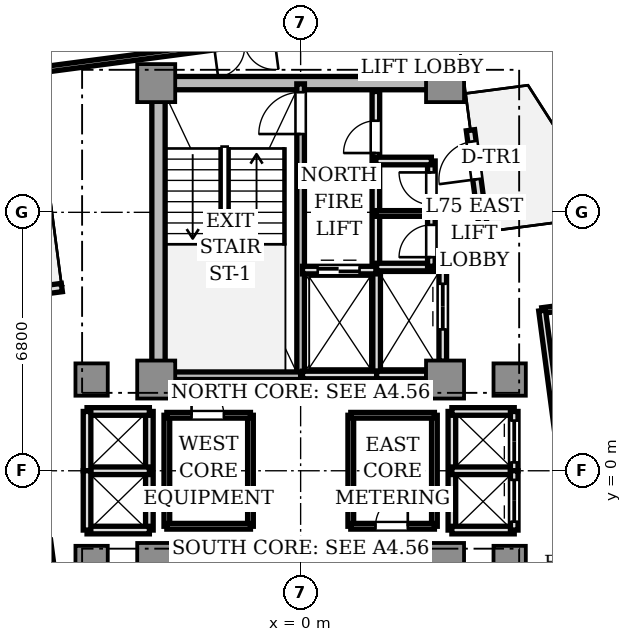
"""IFC4 building model, lengths in metres.
Left out: names, types, materials, properties, quantities, classifications, styles, units other than length and angle.
Written with IfcOpenShell. Run it as: python <this file> out.ifc"""

import sys

from ifc_helpers import new_model, si_unit, direction, frame, frame_2d, origin, origin_2d, place, context, subcontext, project, spatial, rectangle, extrude, source, transform, mapped, element, fill, save


model = new_model("IFC4")
c1 = context("Model", 3, precision=1e-05, world=origin(), true_north=direction((0.0, 1.0)))
c2 = subcontext(c1, "Body", "Model", "MODEL_VIEW")
j1 = project(units=[si_unit("LENGTHUNIT", "METRE"), si_unit("PLANEANGLEUNIT", "RADIAN")], contexts=[c1])
p1 = place(None, origin())
s1 = spatial("IfcSite", under=j1, at=p1, CompositionType="ELEMENT")
p2 = place(p1, origin())
s2 = spatial("IfcBuilding", under=s1, at=p2, CompositionType="ELEMENT")
p3 = place(p2, frame((0.0, 0.0, 269.1)))
s3 = spatial("IfcBuildingStorey", under=s2, at=p3, CompositionType="ELEMENT", Elevation=269.1)
p4 = place(p3, frame((-3.55, 10.2, 0.0), z_axis=(0.0, 0.0, 1.0), x_axis=(1.0, 0.0, 0.0)))
e1 = element("IfcWall", 1, at=p4, inside=s3, PredefinedType="SHEAR", context=c2, shape_type="SweptSolid", body=[
    extrude(rectangle(XDim=7.1, YDim=0.35, at=frame_2d((3.55, 0.0))), origin(), (0.0, 0.0, 1.0), 3.11),
])
p5 = place(p3, frame((-3.74, 2.85, 0.0), z_axis=(0.0, 0.0, 1.0), x_axis=(0.0, 1.0, 0.0)))
e2 = element("IfcWall", 2, at=p5, inside=s3, PredefinedType="SHEAR", context=c2, shape_type="SweptSolid", body=[
    extrude(rectangle(XDim=6.9, YDim=0.35, at=frame_2d((3.45, 0.0))), origin(), (0.0, 0.0, 1.0), 3.11),
])
m1 = source(origin(), c2, "Body", "SweptSolid", [
    extrude(rectangle(XDim=1.0, YDim=1.0, at=origin_2d()), origin(), (0.0, 0.0, 1.0), 3.11),
])
for number, where, z_axis, x_axis in (
    (3, (-3.8, 2.4, 0.0), (0.0, 0.0, 1.0), (1.0, 0.0, 0.0)),
    (4, (3.8, 2.4, 0.0), (0.0, 0.0, 1.0), (1.0, 0.0, 0.0)),
    (5, (-3.8, 10.2, 0.0), (0.0, 0.0, 1.0), (1.0, 0.0, 0.0)),
    (6, (3.8, 10.2, 0.0), (0.0, 0.0, 1.0), (1.0, 0.0, 0.0)),
    (7, (-3.8, -2.4, 0.0), (0.0, 0.0, 1.0), (1.0, 0.0, 0.0)),
    (8, (3.8, -2.4, 0.0), (0.0, 0.0, 1.0), (1.0, 0.0, 0.0)),
):
    element("IfcColumn", number, at=place(p3, frame(where, z_axis=z_axis, x_axis=x_axis)), inside=s3, PredefinedType="COLUMN", context=c2, shape_type="MappedRepresentation", body=[
        mapped(m1, transform((0.0, 0.0, 0.0), scale=1.0)),
    ])
m2 = source(origin(), c2, "Body", "SweptSolid", [
    extrude(rectangle(XDim=0.85, YDim=0.85, at=origin_2d()), origin(), (0.0, 0.0, 1.0), 3.11),
])
for number, where, z_axis, x_axis in (
    (9, (5.5, 2.4, 0.0), (0.0, 0.0, 1.0), (1.0, 0.0, 0.0)),
    (10, (-5.5, 2.4, 0.0), (0.0, 0.0, 1.0), (1.0, 0.0, 0.0)),
    (11, (5.5, -2.4, 0.0), (0.0, 0.0, 1.0), (1.0, 0.0, 0.0)),
    (12, (-5.5, -2.4, 0.0), (0.0, 0.0, 1.0), (1.0, 0.0, 0.0)),
):
    element("IfcColumn", number, at=place(p3, frame(where, z_axis=z_axis, x_axis=x_axis)), inside=s3, PredefinedType="COLUMN", context=c2, shape_type="MappedRepresentation", body=[
        mapped(m2, transform((0.0, 0.0, 0.0), scale=1.0)),
    ])
p6 = place(p3, frame((4.821, 6.283, 0.0), z_axis=(0.0, 0.0, 1.0), x_axis=(-0.130475563272, 0.991451525486, 0.0)))
e13 = element("IfcWall", 13, at=p6, inside=s3, PredefinedType="STANDARD", context=c2, shape_type="SweptSolid", body=[
    extrude(rectangle(XDim=2.7, YDim=0.22, at=frame_2d((1.35, 0.0))), origin(), (0.0, 0.0, 1.0), 3.11),
])
p7 = place(p6, frame((1.4, 0.0, 0.0)))
e14 = element("IfcOpeningElement", 14, at=p7, cuts=e13, PredefinedType="OPENING", context=c2, shape_type="SweptSolid", body=[
    extrude(rectangle(XDim=1.0, YDim=2.2, at=frame_2d((0.5, 1.1))), frame((0.0, 0.12, 0.0), z_axis=(0.0, -1.0, 0.0), x_axis=(1.0, 0.0, 0.0)), (0.0, 0.0, 1.0), 0.24),
])
p8 = place(p3, frame((-6.283, 4.821, 0.0), z_axis=(0.0, 0.0, 1.0), x_axis=(-0.991451525486, -0.130475563272, 0.0)))
e15 = element("IfcWall", 15, at=p8, inside=s3, PredefinedType="STANDARD", context=c2, shape_type="SweptSolid", body=[
    extrude(rectangle(XDim=2.7, YDim=0.22, at=frame_2d((1.35, 0.0))), origin(), (0.0, 0.0, 1.0), 3.11),
])
p9 = place(p8, frame((1.4, 0.0, 0.0)))
e16 = element("IfcOpeningElement", 16, at=p9, cuts=e15, PredefinedType="OPENING", context=c2, shape_type="SweptSolid", body=[
    extrude(rectangle(XDim=1.0, YDim=2.2, at=frame_2d((0.5, 1.1))), frame((0.0, 0.12, 0.0), z_axis=(0.0, -1.0, 0.0), x_axis=(1.0, 0.0, 0.0)), (0.0, 0.0, 1.0), 0.24),
])
p10 = place(p3, frame((0.0, 2.5, 0.0), z_axis=(0.0, 0.0, 1.0), x_axis=(0.0, 1.0, 0.0)))
e17 = element("IfcWall", 17, at=p10, inside=s3, PredefinedType="SOLIDWALL", context=c2, shape_type="SweptSolid", body=[
    extrude(rectangle(XDim=7.68, YDim=0.2, at=frame_2d((3.84, 0.0))), origin(), (0.0, 0.0, 1.0), 3.11),
])
p11 = place(p10, frame((6.36, 0.0, 0.0)))
e18 = element("IfcOpeningElement", 18, at=p11, cuts=e17, PredefinedType="OPENING", context=c2, shape_type="SweptSolid", body=[
    extrude(rectangle(XDim=1.1, YDim=2.15, at=frame_2d((0.55, 1.075))), frame((0.0, 0.11, 0.0), z_axis=(0.0, -1.0, 0.0), x_axis=(1.0, 0.0, 0.0)), (0.0, 0.0, 1.0), 0.22),
])
p12 = place(p3, frame((-3.72, 2.5, 0.0), z_axis=(0.0, 0.0, 1.0), x_axis=(1.0, 0.0, 0.0)))
e19 = element("IfcWall", 19, at=p12, inside=s3, PredefinedType="SOLIDWALL", context=c2, shape_type="SweptSolid", body=[
    extrude(rectangle(XDim=3.72, YDim=0.2, at=frame_2d((1.86, 0.0))), origin(), (0.0, 0.0, 1.0), 3.11),
])
p13 = place(p3, frame((1.98, 5.32, 0.0), z_axis=(0.0, 0.0, 1.0), x_axis=(0.0, 1.0, 0.0)))
e20 = element("IfcWall", 20, at=p13, inside=s3, PredefinedType="SOLIDWALL", context=c2, shape_type="SweptSolid", body=[
    extrude(rectangle(XDim=4.66, YDim=0.2, at=frame_2d((2.33, 0.0))), origin(), (0.0, 0.0, 1.0), 2.66),
])
p14 = place(p13, frame((3.04, 0.0, 0.0)))
e21 = element("IfcOpeningElement", 21, at=p14, cuts=e20, PredefinedType="OPENING", context=c2, shape_type="SweptSolid", body=[
    extrude(rectangle(XDim=0.85, YDim=2.1, at=frame_2d((0.425, 1.05))), frame((0.0, 0.11, 0.0), z_axis=(0.0, -1.0, 0.0), x_axis=(1.0, 0.0, 0.0)), (0.0, 0.0, 1.0), 0.22),
])
p15 = place(p3, frame((2.0, 2.5, 0.0), z_axis=(0.0, 0.0, 1.0), x_axis=(0.0, 1.0, 0.0)))
e22 = element("IfcWall", 22, at=p15, inside=s3, PredefinedType="SOLIDWALL", context=c2, shape_type="SweptSolid", body=[
    extrude(rectangle(XDim=2.78, YDim=0.2, at=frame_2d((1.39, 0.0))), origin(), (0.0, 0.0, 1.0), 2.66),
])
p16 = place(p3, frame((0.05, 2.52, 0.0), z_axis=(0.0, 0.0, 1.0), x_axis=(1.0, 0.0, 0.0)))
e23 = element("IfcWall", 23, at=p16, inside=s3, PredefinedType="SOLIDWALL", context=c2, shape_type="SweptSolid", body=[
    extrude(rectangle(XDim=1.95, YDim=0.2, at=frame_2d((0.975, 0.0))), origin(), (0.0, 0.0, 1.0), 2.66),
])
p17 = place(p3, frame((0.05, 5.28, 0.0), z_axis=(0.0, 0.0, 1.0), x_axis=(1.0, 0.0, 0.0)))
e24 = element("IfcWall", 24, at=p17, inside=s3, PredefinedType="SOLIDWALL", context=c2, shape_type="SweptSolid", body=[
    extrude(rectangle(XDim=1.93, YDim=0.2, at=frame_2d((0.965, 0.0))), origin(), (0.0, 0.0, 1.0), 2.66),
])
p18 = place(p17, frame((0.4, 0.0, 0.0)))
e25 = element("IfcOpeningElement", 25, at=p18, cuts=e24, PredefinedType="OPENING", context=c2, shape_type="SweptSolid", body=[
    extrude(rectangle(XDim=1.1, YDim=2.2, at=frame_2d((0.55, 1.1))), frame((0.0, 0.11, 0.0), z_axis=(0.0, -1.0, 0.0), x_axis=(1.0, 0.0, 0.0)), (0.0, 0.0, 1.0), 0.22),
])
p19 = place(p3, frame((2.0, 2.52, 0.0), z_axis=(0.0, 0.0, 1.0), x_axis=(1.0, 0.0, 0.0)))
e26 = element("IfcWall", 26, at=p19, inside=s3, PredefinedType="SOLIDWALL", context=c2, shape_type="SweptSolid", body=[
    extrude(rectangle(XDim=1.32, YDim=0.2, at=frame_2d((0.66, 0.0))), origin(), (0.0, 0.0, 1.0), 2.66),
])
p20 = place(p3, frame((2.0, 5.36, 0.0), z_axis=(0.0, 0.0, 1.0), x_axis=(1.0, 0.0, 0.0)))
e27 = element("IfcWall", 27, at=p20, inside=s3, PredefinedType="SOLIDWALL", context=c2, shape_type="SweptSolid", body=[
    extrude(rectangle(XDim=1.74, YDim=0.2, at=frame_2d((0.87, 0.0))), origin(), (0.0, 0.0, 1.0), 2.66),
])
p21 = place(p3, frame((3.74, 2.88, 0.0), z_axis=(0.0, 0.0, 1.0), x_axis=(0.0, 1.0, 0.0)))
e28 = element("IfcWall", 28, at=p21, inside=s3, PredefinedType="SOLIDWALL", context=c2, shape_type="SweptSolid", body=[
    extrude(rectangle(XDim=2.48, YDim=0.2, at=frame_2d((1.24, 0.0))), origin(), (0.0, 0.0, 1.0), 2.66),
])
p22 = place(p21, frame((0.84, 0.0, 0.0)))
e29 = element("IfcOpeningElement", 29, at=p22, cuts=e28, PredefinedType="OPENING", context=c2, shape_type="SweptSolid", body=[
    extrude(rectangle(XDim=1.2, YDim=2.2, at=frame_2d((0.6, 1.1))), frame((0.0, 0.11, 0.0), z_axis=(0.0, -1.0, 0.0), x_axis=(1.0, 0.0, 0.0)), (0.0, 0.0, 1.0), 0.22),
])
p23 = place(p3, frame((3.98, -1.56, 0.0), z_axis=(0.0, 0.0, 1.0), x_axis=(0.0, 1.0, 0.0)))
e30 = element("IfcWall", 30, at=p23, inside=s3, PredefinedType="SOLIDWALL", context=c2, shape_type="SweptSolid", body=[
    extrude(rectangle(XDim=3.12, YDim=0.2, at=frame_2d((1.56, 0.0))), origin(), (0.0, 0.0, 1.0), 2.33),
])
for number, where, z_axis, x_axis in (
    (31, (3.98, 1.56, 0.0), (0.0, 0.0, 1.0), (1.0, 0.0, 0.0)),
    (32, (3.98, -1.56, 0.0), (0.0, 0.0, 1.0), (1.0, 0.0, 0.0)),
    (33, (3.98, 0.0, 0.0), (0.0, 0.0, 1.0), (1.0, 0.0, 0.0)),
):
    element("IfcWall", number, at=place(p3, frame(where, z_axis=z_axis, x_axis=x_axis)), inside=s3, PredefinedType="SOLIDWALL", context=c2, shape_type="SweptSolid", body=[
        extrude(rectangle(XDim=1.64, YDim=0.2, at=frame_2d((0.82, 0.0))), origin(), (0.0, 0.0, 1.0), 2.66),
    ])
p24 = place(p3, frame((5.62, 0.0, 0.0), z_axis=(0.0, 0.0, 1.0), x_axis=(0.0, 1.0, 0.0)))
e34 = element("IfcWall", 34, at=p24, inside=s3, PredefinedType="SOLIDWALL", context=c2, shape_type="SweptSolid", body=[
    extrude(rectangle(XDim=1.56, YDim=0.2, at=frame_2d((0.78, 0.0))), origin(), (0.0, 0.0, 1.0), 2.66),
])
p25 = place(p24, frame((0.22, 0.0, 0.0)))
e35 = element("IfcOpeningElement", 35, at=p25, cuts=e34, PredefinedType="OPENING", context=c2, shape_type="SweptSolid", body=[
    extrude(rectangle(XDim=1.1, YDim=2.2, at=frame_2d((0.55, 1.1))), frame((0.0, 0.11, 0.0), z_axis=(0.0, -1.0, 0.0), x_axis=(1.0, 0.0, 0.0)), (0.0, 0.0, 1.0), 0.22),
])
p26 = place(p3, frame((5.62, -1.56, 0.0), z_axis=(0.0, 0.0, 1.0), x_axis=(0.0, 1.0, 0.0)))
e36 = element("IfcWall", 36, at=p26, inside=s3, PredefinedType="SOLIDWALL", context=c2, shape_type="SweptSolid", body=[
    extrude(rectangle(XDim=1.56, YDim=0.2, at=frame_2d((0.78, 0.0))), origin(), (0.0, 0.0, 1.0), 2.66),
])
p27 = place(p26, frame((0.22, 0.0, 0.0)))
e37 = element("IfcOpeningElement", 37, at=p27, cuts=e36, PredefinedType="OPENING", context=c2, shape_type="SweptSolid", body=[
    extrude(rectangle(XDim=1.1, YDim=2.2, at=frame_2d((0.55, 1.1))), frame((0.0, 0.11, 0.0), z_axis=(0.0, -1.0, 0.0), x_axis=(1.0, 0.0, 0.0)), (0.0, 0.0, 1.0), 0.22),
])
p28 = place(p3, frame((-3.98, -1.56, 0.0), z_axis=(0.0, 0.0, 1.0), x_axis=(0.0, 1.0, 0.0)))
e38 = element("IfcWall", 38, at=p28, inside=s3, PredefinedType="SOLIDWALL", context=c2, shape_type="SweptSolid", body=[
    extrude(rectangle(XDim=3.12, YDim=0.2, at=frame_2d((1.56, 0.0))), origin(), (0.0, 0.0, 1.0), 2.33),
])
for number, where, z_axis, x_axis in (
    (39, (-5.62, 1.56, 0.0), (0.0, 0.0, 1.0), (1.0, 0.0, 0.0)),
    (40, (-5.62, -1.56, 0.0), (0.0, 0.0, 1.0), (1.0, 0.0, 0.0)),
    (41, (-5.62, 0.0, 0.0), (0.0, 0.0, 1.0), (1.0, 0.0, 0.0)),
):
    element("IfcWall", number, at=place(p3, frame(where, z_axis=z_axis, x_axis=x_axis)), inside=s3, PredefinedType="SOLIDWALL", context=c2, shape_type="SweptSolid", body=[
        extrude(rectangle(XDim=1.64, YDim=0.2, at=frame_2d((0.82, 0.0))), origin(), (0.0, 0.0, 1.0), 2.66),
    ])
for number, where, z_axis, x_axis in (
    (42, (-5.62, 0.0, 0.0), (0.0, 0.0, 1.0), (0.0, 1.0, 0.0)),
    (43, (-5.62, -1.56, 0.0), (0.0, 0.0, 1.0), (0.0, 1.0, 0.0)),
):
    element("IfcWall", number, at=place(p3, frame(where, z_axis=z_axis, x_axis=x_axis)), inside=s3, PredefinedType="SOLIDWALL", context=c2, shape_type="SweptSolid", body=[
        extrude(rectangle(XDim=1.56, YDim=0.2, at=frame_2d((0.78, 0.0))), origin(), (0.0, 0.0, 1.0), 2.66),
    ])
p29 = place(p3, frame((3.44, 5.38, 0.0), z_axis=(0.0, 0.0, 1.0), x_axis=(0.0, 1.0, 0.0)))
e44 = element("IfcWall", 44, at=p29, inside=s3, PredefinedType="SOLIDWALL", context=c2, shape_type="SweptSolid", body=[
    extrude(rectangle(XDim=2.77, YDim=0.2, at=frame_2d((1.385, 0.0))), origin(), (0.0, 0.0, 1.0), 2.66),
])
p30 = place(p29, frame((0.24, 0.0, 0.0)))
e45 = element("IfcOpeningElement", 45, at=p30, cuts=e44, PredefinedType="OPENING", context=c2, shape_type="SweptSolid", body=[
    extrude(rectangle(XDim=0.85, YDim=2.1, at=frame_2d((0.425, 1.05))), frame((0.0, 0.11, 0.0), z_axis=(0.0, -1.0, 0.0), x_axis=(1.0, 0.0, 0.0)), (0.0, 0.0, 1.0), 0.22),
])
p31 = place(p29, frame((1.62, 0.0, 0.0)))
e46 = element("IfcOpeningElement", 46, at=p31, cuts=e44, PredefinedType="OPENING", context=c2, shape_type="SweptSolid", body=[
    extrude(rectangle(XDim=0.85, YDim=2.1, at=frame_2d((0.425, 1.05))), frame((0.0, 0.11, 0.0), z_axis=(0.0, -1.0, 0.0), x_axis=(1.0, 0.0, 0.0)), (0.0, 0.0, 1.0), 0.22),
])
p32 = place(p3, frame((1.98, 8.15, 0.0), z_axis=(0.0, 0.0, 1.0), x_axis=(1.0, 0.0, 0.0)))
e47 = element("IfcWall", 47, at=p32, inside=s3, PredefinedType="SOLIDWALL", context=c2, shape_type="SweptSolid", body=[
    extrude(rectangle(XDim=1.46, YDim=0.2, at=frame_2d((0.73, 0.0))), origin(), (0.0, 0.0, 1.0), 2.66),
])
p33 = place(p3, frame((1.98, 6.77, 0.0), z_axis=(0.0, 0.0, 1.0), x_axis=(1.0, 0.0, 0.0)))
e48 = element("IfcWall", 48, at=p33, inside=s3, PredefinedType="PARTITIONING", context=c2, shape_type="SweptSolid", body=[
    extrude(rectangle(XDim=1.46, YDim=0.15, at=frame_2d((0.73, 0.0))), origin(), (0.0, 0.0, 1.0), 2.66),
])
p34 = place(p3, frame((-1.32, -1.46, 0.0), z_axis=(0.0, 0.0, 1.0), x_axis=(0.0, 1.0, 0.0)))
e49 = element("IfcWall", 49, at=p34, inside=s3, PredefinedType="PARTITIONING", context=c2, shape_type="SweptSolid", body=[
    extrude(rectangle(XDim=2.92, YDim=0.15, at=frame_2d((1.46, 0.0))), origin(), (0.0, 0.0, 1.0), 2.66),
])
p35 = place(p3, frame((-3.52, -1.46, 0.0), z_axis=(0.0, 0.0, 1.0), x_axis=(0.0, 1.0, 0.0)))
e50 = element("IfcWall", 50, at=p35, inside=s3, PredefinedType="PARTITIONING", context=c2, shape_type="SweptSolid", body=[
    extrude(rectangle(XDim=2.92, YDim=0.15, at=frame_2d((1.46, 0.0))), origin(), (0.0, 0.0, 1.0), 2.33),
])
p36 = place(p3, frame((-3.52, 1.46, 0.0), z_axis=(0.0, 0.0, 1.0), x_axis=(1.0, 0.0, 0.0)))
e51 = element("IfcWall", 51, at=p36, inside=s3, PredefinedType="PARTITIONING", context=c2, shape_type="SweptSolid", body=[
    extrude(rectangle(XDim=2.2, YDim=0.15, at=frame_2d((1.1, 0.0))), origin(), (0.0, 0.0, 1.0), 2.66),
])
p37 = place(p36, frame((0.65, 0.0, 0.0)))
e52 = element("IfcOpeningElement", 52, at=p37, cuts=e51, PredefinedType="OPENING", context=c2, shape_type="SweptSolid", body=[
    extrude(rectangle(XDim=0.85, YDim=2.1, at=frame_2d((0.425, 1.05))), frame((0.0, 0.085, 0.0), z_axis=(0.0, -1.0, 0.0), x_axis=(1.0, 0.0, 0.0)), (0.0, 0.0, 1.0), 0.17),
])
p38 = place(p3, frame((-3.52, -1.46, 0.0), z_axis=(0.0, 0.0, 1.0), x_axis=(1.0, 0.0, 0.0)))
e53 = element("IfcWall", 53, at=p38, inside=s3, PredefinedType="PARTITIONING", context=c2, shape_type="SweptSolid", body=[
    extrude(rectangle(XDim=2.2, YDim=0.15, at=frame_2d((1.1, 0.0))), origin(), (0.0, 0.0, 1.0), 2.66),
])
p39 = place(p3, frame((1.32, -1.46, 0.0), z_axis=(0.0, 0.0, 1.0), x_axis=(0.0, 1.0, 0.0)))
e54 = element("IfcWall", 54, at=p39, inside=s3, PredefinedType="PARTITIONING", context=c2, shape_type="SweptSolid", body=[
    extrude(rectangle(XDim=2.92, YDim=0.15, at=frame_2d((1.46, 0.0))), origin(), (0.0, 0.0, 1.0), 2.66),
])
p40 = place(p3, frame((3.52, -1.46, 0.0), z_axis=(0.0, 0.0, 1.0), x_axis=(0.0, 1.0, 0.0)))
e55 = element("IfcWall", 55, at=p40, inside=s3, PredefinedType="PARTITIONING", context=c2, shape_type="SweptSolid", body=[
    extrude(rectangle(XDim=2.92, YDim=0.15, at=frame_2d((1.46, 0.0))), origin(), (0.0, 0.0, 1.0), 2.33),
])
p41 = place(p3, frame((1.32, 1.46, 0.0), z_axis=(0.0, 0.0, 1.0), x_axis=(1.0, 0.0, 0.0)))
e56 = element("IfcWall", 56, at=p41, inside=s3, PredefinedType="PARTITIONING", context=c2, shape_type="SweptSolid", body=[
    extrude(rectangle(XDim=2.2, YDim=0.15, at=frame_2d((1.1, 0.0))), origin(), (0.0, 0.0, 1.0), 2.66),
])
p42 = place(p3, frame((1.32, -1.46, 0.0), z_axis=(0.0, 0.0, 1.0), x_axis=(1.0, 0.0, 0.0)))
e57 = element("IfcWall", 57, at=p42, inside=s3, PredefinedType="PARTITIONING", context=c2, shape_type="SweptSolid", body=[
    extrude(rectangle(XDim=2.2, YDim=0.15, at=frame_2d((1.1, 0.0))), origin(), (0.0, 0.0, 1.0), 2.66),
])
p43 = place(p42, frame((0.65, 0.0, 0.0)))
e58 = element("IfcOpeningElement", 58, at=p43, cuts=e57, PredefinedType="OPENING", context=c2, shape_type="SweptSolid", body=[
    extrude(rectangle(XDim=0.85, YDim=2.1, at=frame_2d((0.425, 1.05))), frame((0.0, 0.085, 0.0), z_axis=(0.0, -1.0, 0.0), x_axis=(1.0, 0.0, 0.0)), (0.0, 0.0, 1.0), 0.17),
])
p44 = place(p3, frame((6.354, 4.215, 0.0), z_axis=(0.0, 0.0, 1.0), x_axis=(0.991441861772, 0.130548974432, 0.0)))
e59 = element("IfcWall", 59, at=p44, inside=s3, PredefinedType="PARTITIONING", context=c2, shape_type="SweptSolid", body=[
    extrude(rectangle(XDim=8.29, YDim=0.15, at=frame_2d((4.145, 0.0))), origin(), (0.0, 0.0, 1.0), 2.66),
])
p45 = place(p44, frame((1.431, 0.0, 0.0)))
e60 = element("IfcOpeningElement", 60, at=p45, cuts=e59, PredefinedType="OPENING", context=c2, shape_type="SweptSolid", body=[
    extrude(rectangle(XDim=0.85, YDim=2.1, at=frame_2d((0.425, 1.05))), frame((0.0, 0.085, 0.0), z_axis=(0.0, -1.0, 0.0), x_axis=(1.0, 0.0, 0.0)), (0.0, 0.0, 1.0), 0.17),
])
p46 = place(p44, frame((4.602, 0.0, 0.0)))
e61 = element("IfcOpeningElement", 61, at=p46, cuts=e59, PredefinedType="OPENING", context=c2, shape_type="SweptSolid", body=[
    extrude(rectangle(XDim=0.85, YDim=2.1, at=frame_2d((0.425, 1.05))), frame((0.0, 0.085, 0.0), z_axis=(0.0, -1.0, 0.0), x_axis=(1.0, 0.0, 0.0)), (0.0, 0.0, 1.0), 0.17),
])
p47 = place(p3, frame((7.516, -4.608, 0.0), z_axis=(0.0, 0.0, 1.0), x_axis=(-0.130548179903, 0.991441966392, 0.0)))
e62 = element("IfcWall", 62, at=p47, inside=s3, PredefinedType="PARTITIONING", context=c2, shape_type="SweptSolid", body=[
    extrude(rectangle(XDim=8.9, YDim=0.18, at=frame_2d((4.45, 0.0))), origin(), (0.0, 0.0, 1.0), 2.66),
])
p48 = place(p3, frame((4.021, 11.977, 0.0), z_axis=(0.0, 0.0, 1.0), x_axis=(-0.991445908749, -0.130518236368, 0.0)))
e63 = element("IfcWall", 63, at=p48, inside=s3, PredefinedType="PARTITIONING", context=c2, shape_type="SweptSolid", body=[
    extrude(rectangle(XDim=11.1, YDim=0.15, at=frame_2d((5.55, 0.0))), origin(), (0.0, 0.0, 1.0), 2.66),
])
p49 = place(p48, frame((4.75, 0.0, 0.0)))
e64 = element("IfcOpeningElement", 64, at=p49, cuts=e63, PredefinedType="OPENING", context=c2, shape_type="SweptSolid", body=[
    extrude(rectangle(XDim=1.6, YDim=2.25, at=frame_2d((0.8, 1.125))), frame((0.0, 0.085, 0.0), z_axis=(0.0, -1.0, 0.0), x_axis=(1.0, 0.0, 0.0)), (0.0, 0.0, 1.0), 0.17),
])
p50 = place(p3, frame((-6.667, -1.836, 0.0), z_axis=(0.0, 0.0, 1.0), x_axis=(0.130564346904, -0.991439837467, 0.0)))
e65 = element("IfcWall", 65, at=p50, inside=s3, PredefinedType="PARTITIONING", context=c2, shape_type="SweptSolid", body=[
    extrude(rectangle(XDim=4.6, YDim=0.18, at=frame_2d((2.3, 0.0))), origin(), (0.0, 0.0, 1.0), 2.66),
])
m3 = source(origin(), c2, "Body", "SweptSolid", [
    extrude(rectangle(XDim=1.0, YDim=0.05, at=origin_2d()), origin(), (0.0, 0.0, 1.0), 2.2),
])
p51 = place(p7, frame((0.5, 0.0, 0.0)))
e66 = element("IfcDoor", 66, at=p51, inside=s3, OperationType="SINGLE_SWING_LEFT", PredefinedType="DOOR", context=c2, shape_type="MappedRepresentation", body=[
    mapped(m3, transform((0.0, 0.0, 0.0), scale=1.0)),
])
fill(e14, e66)
m4 = source(origin(), c2, "Body", "SweptSolid", [
    extrude(rectangle(XDim=1.1, YDim=0.05, at=origin_2d()), origin(), (0.0, 0.0, 1.0), 2.15),
])
p52 = place(p11, frame((0.55, 0.0, 0.0)))
e67 = element("IfcDoor", 67, at=p52, inside=s3, OperationType="SINGLE_SWING_LEFT", PredefinedType="DOOR", context=c2, shape_type="MappedRepresentation", body=[
    mapped(m4, transform((0.0, 0.0, 0.0), scale=1.0)),
])
fill(e18, e67)
m5 = source(origin(), c2, "Body", "SweptSolid", [
    extrude(rectangle(XDim=0.85, YDim=0.05, at=origin_2d()), origin(), (0.0, 0.0, 1.0), 2.1),
])
p53 = place(p14, frame((0.425, 0.0, 0.0)))
e68 = element("IfcDoor", 68, at=p53, inside=s3, OperationType="SINGLE_SWING_LEFT", PredefinedType="DOOR", context=c2, shape_type="MappedRepresentation", body=[
    mapped(m5, transform((0.0, 0.0, 0.0), scale=1.0)),
])
fill(e21, e68)
m6 = source(origin(), c2, "Body", "SweptSolid", [
    extrude(rectangle(XDim=1.1, YDim=0.05, at=origin_2d()), origin(), (0.0, 0.0, 1.0), 2.2),
])
p54 = place(p18, frame((0.55, 0.0, 0.0)))
e69 = element("IfcDoor", 69, at=p54, inside=s3, OperationType="DOUBLE_DOOR_SLIDING", PredefinedType="DOOR", context=c2, shape_type="MappedRepresentation", body=[
    mapped(m6, transform((0.0, 0.0, 0.0), scale=1.0)),
])
fill(e25, e69)
m7 = source(origin(), c2, "Body", "SweptSolid", [
    extrude(rectangle(XDim=1.2, YDim=0.05, at=origin_2d()), origin(), (0.0, 0.0, 1.0), 2.2),
])
p55 = place(p22, frame((0.6, 0.0, 0.0)))
e70 = element("IfcDoor", 70, at=p55, inside=s3, OperationType="DOUBLE_DOOR_SLIDING", PredefinedType="DOOR", context=c2, shape_type="MappedRepresentation", body=[
    mapped(m7, transform((0.0, 0.0, 0.0), scale=1.0)),
])
fill(e29, e70)
p56 = place(p25, frame((0.55, 0.0, 0.0)))
e71 = element("IfcDoor", 71, at=p56, inside=s3, OperationType="DOUBLE_DOOR_SLIDING", PredefinedType="DOOR", context=c2, shape_type="MappedRepresentation", body=[
    mapped(m6, transform((0.0, 0.0, 0.0), scale=1.0)),
])
fill(e35, e71)
p57 = place(p27, frame((0.55, 0.0, 0.0)))
e72 = element("IfcDoor", 72, at=p57, inside=s3, OperationType="DOUBLE_DOOR_SLIDING", PredefinedType="DOOR", context=c2, shape_type="MappedRepresentation", body=[
    mapped(m6, transform((0.0, 0.0, 0.0), scale=1.0)),
])
fill(e37, e72)
p58 = place(p30, frame((0.425, 0.0, 0.0)))
e73 = element("IfcDoor", 73, at=p58, inside=s3, OperationType="SINGLE_SWING_LEFT", PredefinedType="DOOR", context=c2, shape_type="MappedRepresentation", body=[
    mapped(m5, transform((0.0, 0.0, 0.0), scale=1.0)),
])
fill(e45, e73)
p59 = place(p31, frame((0.425, 0.0, 0.0)))
e74 = element("IfcDoor", 74, at=p59, inside=s3, OperationType="SINGLE_SWING_RIGHT", PredefinedType="DOOR", context=c2, shape_type="MappedRepresentation", body=[
    mapped(m5, transform((0.0, 0.0, 0.0), scale=1.0)),
])
fill(e46, e74)
p60 = place(p37, frame((0.425, 0.0, 0.0)))
e75 = element("IfcDoor", 75, at=p60, inside=s3, OperationType="SINGLE_SWING_LEFT", PredefinedType="DOOR", context=c2, shape_type="MappedRepresentation", body=[
    mapped(m5, transform((0.0, 0.0, 0.0), scale=1.0)),
])
fill(e52, e75)
p61 = place(p43, frame((0.425, 0.0, 0.0)))
e76 = element("IfcDoor", 76, at=p61, inside=s3, OperationType="SINGLE_SWING_RIGHT", PredefinedType="DOOR", context=c2, shape_type="MappedRepresentation", body=[
    mapped(m5, transform((0.0, 0.0, 0.0), scale=1.0)),
])
fill(e58, e76)
save(model, sys.argv[1])
